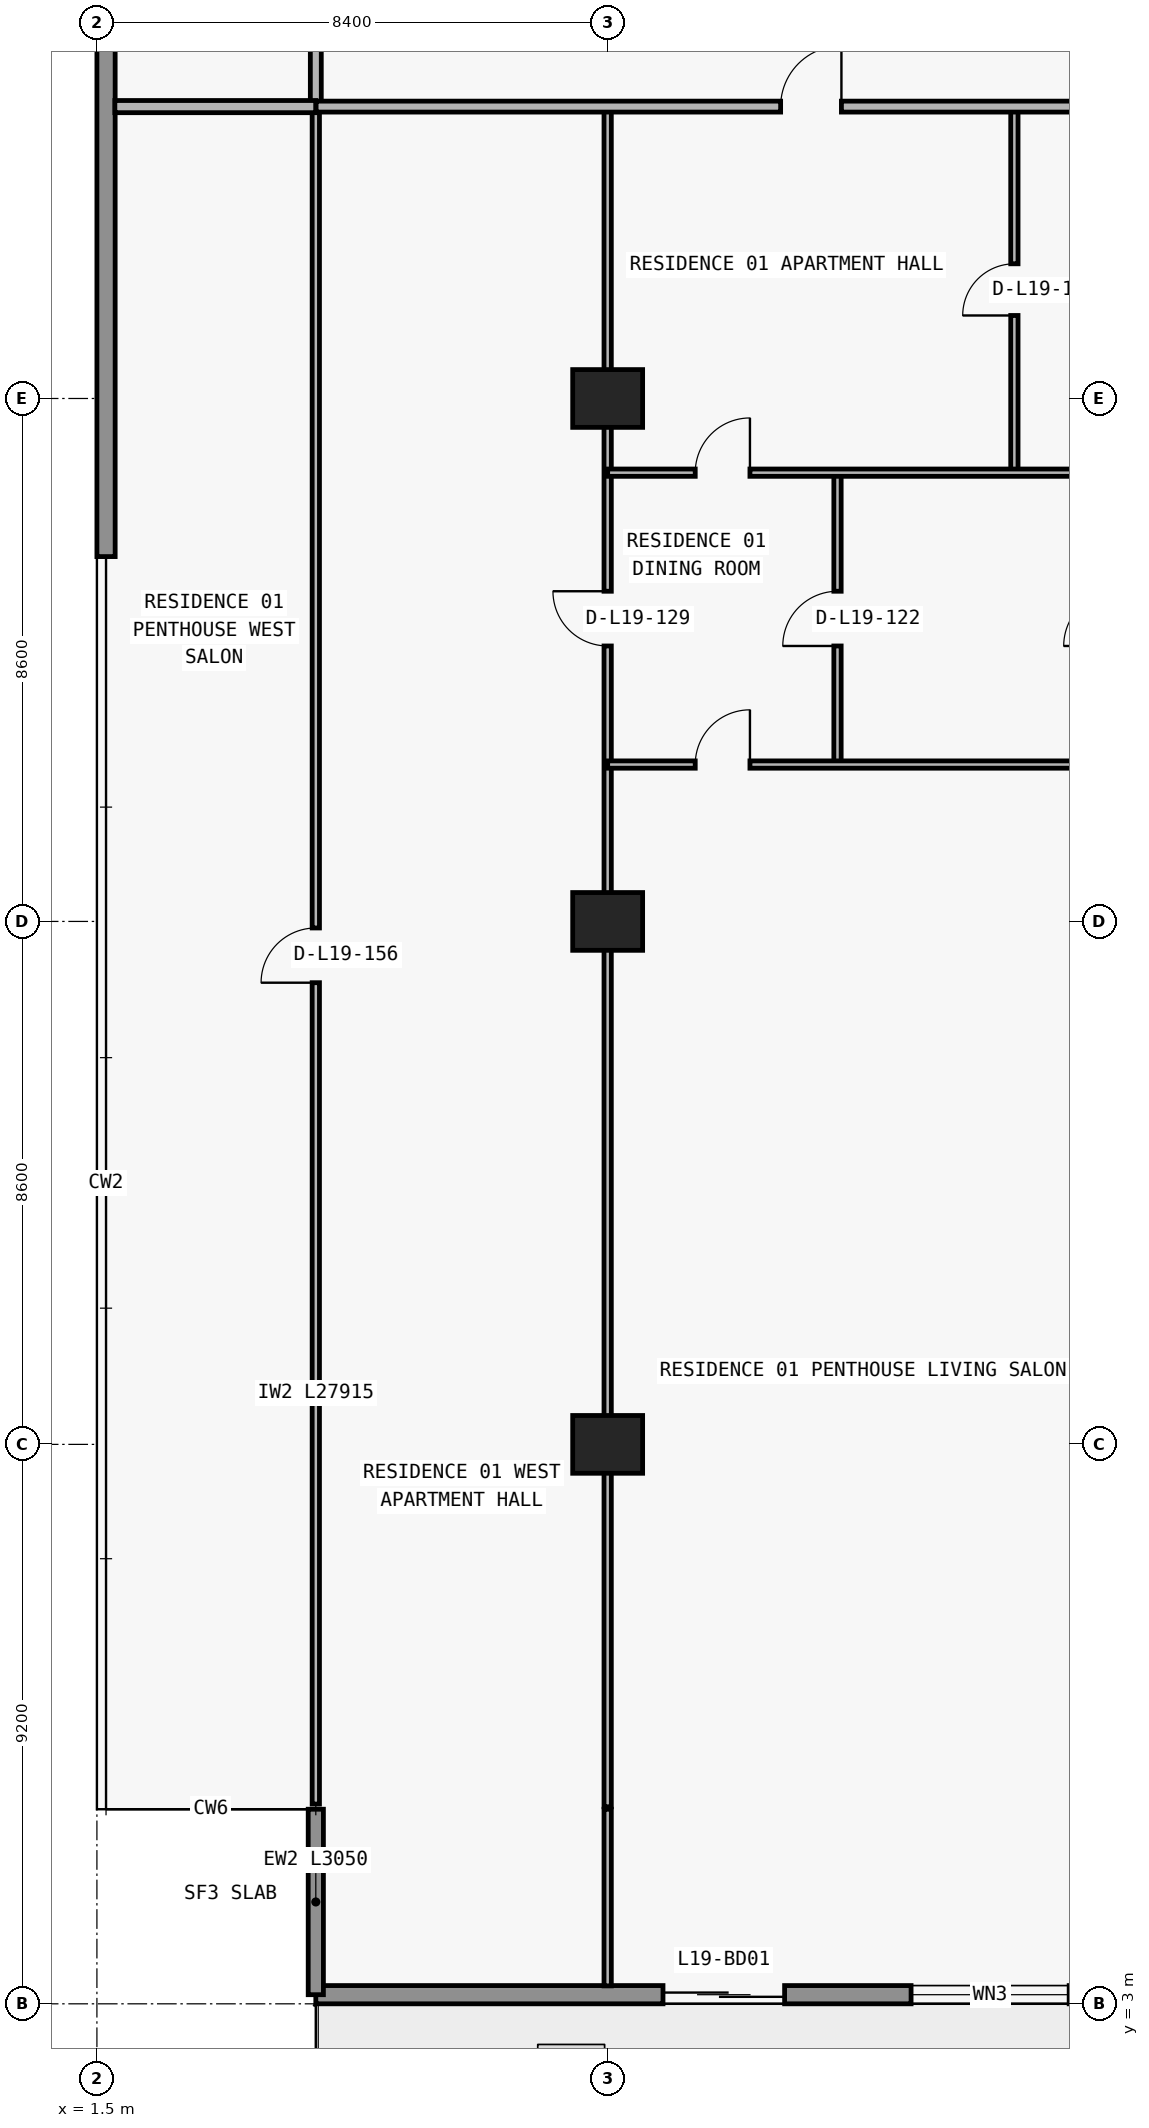
"""IFC4 building model, lengths in metres.
Left out: names, types, materials, properties, quantities, classifications, styles, units other than length and angle.
Written with IfcOpenShell. Run it as: python <this file> out.ifc"""

import sys

from ifc_helpers import new_model, si_unit, direction, frame, frame_2d, origin, origin_2d, place, context, subcontext, project, spatial, rectangle, extrude, element, fill, save


model = new_model("IFC4")
c1 = context("Model", 3, precision=1e-05, world=origin(), true_north=direction((0.0, 1.0)))
c2 = subcontext(c1, "Body", "Model", "MODEL_VIEW")
j1 = project(units=[si_unit("LENGTHUNIT", "METRE"), si_unit("PLANEANGLEUNIT", "RADIAN")], contexts=[c1])
p1 = place(None, origin())
s1 = spatial("IfcSite", under=j1, at=p1, CompositionType="ELEMENT")
p2 = place(p1, origin())
s2 = spatial("IfcBuilding", under=s1, at=p2, CompositionType="ELEMENT")
p3 = place(p2, frame((0.0, 0.0, 72.9)))
s3 = spatial("IfcBuildingStorey", under=s2, at=p3, CompositionType="ELEMENT", Elevation=72.9)
for number, where, z_axis, x_axis in (
    (1, (9.9, 12.2, 0.0), (0.0, 0.0, 1.0), (1.0, 0.0, 0.0)),
    (2, (9.9, 20.8, 0.0), (0.0, 0.0, 1.0), (1.0, 0.0, 0.0)),
    (3, (9.9, 29.4, 0.0), (0.0, 0.0, 1.0), (1.0, 0.0, 0.0)),
):
    element("IfcColumn", number, at=place(p3, frame(where, z_axis=z_axis, x_axis=x_axis)), inside=s3, PredefinedType="COLUMN", context=c2, shape_type="SweptSolid", body=[
        extrude(rectangle(XDim=1.15, YDim=0.95, at=origin_2d()), origin(), (0.0, 0.0, 1.0), 3.05),
    ])
p4 = place(p3, frame((72.7, 3.15, 0.0), z_axis=(0.0, 0.0, 1.0), x_axis=(-1.0, 0.0, 0.0)))
e4 = element("IfcWall", 4, at=p4, inside=s3, PredefinedType="STANDARD", context=c2, shape_type="SweptSolid", body=[
    extrude(rectangle(XDim=67.6, YDim=0.3, at=frame_2d((33.8, 0.0))), origin(), (0.0, 0.0, 1.0), 3.05),
])
p5 = place(p4, frame((59.89, 0.0, 0.0)))
e5 = element("IfcOpeningElement", 5, at=p5, cuts=e4, PredefinedType="OPENING", context=c2, shape_type="SweptSolid", body=[
    extrude(rectangle(XDim=2.0, YDim=2.3, at=frame_2d((1.0, 1.15))), frame((0.0, 0.16, 0.0), z_axis=(0.0, -1.0, 0.0), x_axis=(1.0, 0.0, 0.0)), (0.0, 0.0, 1.0), 0.32),
])
p6 = place(p4, frame((55.21, 0.0, 0.65)))
e6 = element("IfcOpeningElement", 6, at=p6, cuts=e4, PredefinedType="OPENING", context=c2, shape_type="SweptSolid", body=[
    extrude(rectangle(XDim=2.6, YDim=1.85, at=frame_2d((1.3, 0.925))), frame((0.0, 0.16, 0.0), z_axis=(0.0, -1.0, 0.0), x_axis=(1.0, 0.0, 0.0)), (0.0, 0.0, 1.0), 0.32),
])
p7 = place(p4, frame((49.1, 0.0, 0.85)))
e7 = element("IfcOpeningElement", 7, at=p7, cuts=e4, PredefinedType="OPENING", context=c2, shape_type="SweptSolid", body=[
    extrude(rectangle(XDim=2.2, YDim=1.55, at=frame_2d((1.1, 0.775))), frame((0.0, 0.16, 0.0), z_axis=(0.0, -1.0, 0.0), x_axis=(1.0, 0.0, 0.0)), (0.0, 0.0, 1.0), 0.32),
])
p8 = place(p4, frame((43.09, 0.0, 0.0)))
e8 = element("IfcOpeningElement", 8, at=p8, cuts=e4, PredefinedType="OPENING", context=c2, shape_type="SweptSolid", body=[
    extrude(rectangle(XDim=2.0, YDim=2.3, at=frame_2d((1.0, 1.15))), frame((0.0, 0.16, 0.0), z_axis=(0.0, -1.0, 0.0), x_axis=(1.0, 0.0, 0.0)), (0.0, 0.0, 1.0), 0.32),
])
p9 = place(p4, frame((38.41, 0.0, 0.65)))
e9 = element("IfcOpeningElement", 9, at=p9, cuts=e4, PredefinedType="OPENING", context=c2, shape_type="SweptSolid", body=[
    extrude(rectangle(XDim=2.6, YDim=1.85, at=frame_2d((1.3, 0.925))), frame((0.0, 0.16, 0.0), z_axis=(0.0, -1.0, 0.0), x_axis=(1.0, 0.0, 0.0)), (0.0, 0.0, 1.0), 0.32),
])
p10 = place(p4, frame((32.7, 0.0, 0.85)))
e10 = element("IfcOpeningElement", 10, at=p10, cuts=e4, PredefinedType="OPENING", context=c2, shape_type="SweptSolid", body=[
    extrude(rectangle(XDim=2.2, YDim=1.55, at=frame_2d((1.1, 0.775))), frame((0.0, 0.16, 0.0), z_axis=(0.0, -1.0, 0.0), x_axis=(1.0, 0.0, 0.0)), (0.0, 0.0, 1.0), 0.32),
])
p11 = place(p4, frame((24.7, 0.0, 0.85)))
e11 = element("IfcOpeningElement", 11, at=p11, cuts=e4, PredefinedType="OPENING", context=c2, shape_type="SweptSolid", body=[
    extrude(rectangle(XDim=2.2, YDim=1.55, at=frame_2d((1.1, 0.775))), frame((0.0, 0.16, 0.0), z_axis=(0.0, -1.0, 0.0), x_axis=(1.0, 0.0, 0.0)), (0.0, 0.0, 1.0), 0.32),
])
p12 = place(p4, frame((18.69, 0.0, 0.0)))
e12 = element("IfcOpeningElement", 12, at=p12, cuts=e4, PredefinedType="OPENING", context=c2, shape_type="SweptSolid", body=[
    extrude(rectangle(XDim=2.0, YDim=2.3, at=frame_2d((1.0, 1.15))), frame((0.0, 0.16, 0.0), z_axis=(0.0, -1.0, 0.0), x_axis=(1.0, 0.0, 0.0)), (0.0, 0.0, 1.0), 0.32),
])
p13 = place(p4, frame((14.01, 0.0, 0.65)))
e13 = element("IfcOpeningElement", 13, at=p13, cuts=e4, PredefinedType="OPENING", context=c2, shape_type="SweptSolid", body=[
    extrude(rectangle(XDim=2.6, YDim=1.85, at=frame_2d((1.3, 0.925))), frame((0.0, 0.16, 0.0), z_axis=(0.0, -1.0, 0.0), x_axis=(1.0, 0.0, 0.0)), (0.0, 0.0, 1.0), 0.32),
])
p14 = place(p4, frame((7.9, 0.0, 0.85)))
e14 = element("IfcOpeningElement", 14, at=p14, cuts=e4, PredefinedType="OPENING", context=c2, shape_type="SweptSolid", body=[
    extrude(rectangle(XDim=2.2, YDim=1.55, at=frame_2d((1.1, 0.775))), frame((0.0, 0.16, 0.0), z_axis=(0.0, -1.0, 0.0), x_axis=(1.0, 0.0, 0.0)), (0.0, 0.0, 1.0), 0.32),
])
p15 = place(p3, frame((5.1, 6.2, 0.0), z_axis=(0.0, 0.0, 1.0), x_axis=(0.0, -1.0, 0.0)))
e15 = element("IfcWall", 15, at=p15, inside=s3, PredefinedType="ELEMENTEDWALL", context=c2, shape_type="SweptSolid", body=[
    extrude(rectangle(XDim=3.05, YDim=0.25, at=frame_2d((1.525, 0.0))), origin(), (0.0, 0.0, 1.0), 3.05),
])
p16 = place(p3, frame((1.65, 26.8, 0.0), z_axis=(0.0, 0.0, 1.0), x_axis=(0.0, 1.0, 0.0)))
e16 = element("IfcWall", 16, at=p16, inside=s3, PredefinedType="STANDARD", context=c2, shape_type="SweptSolid", body=[
    extrude(rectangle(XDim=20.6, YDim=0.3, at=frame_2d((10.3, 0.0))), origin(), (0.0, 0.0, 1.0), 3.05),
])
p17 = place(p3, frame((5.1, 6.285, 0.0), z_axis=(0.0, 0.0, 1.0), x_axis=(0.0, 1.0, 0.0)))
e17 = element("IfcWall", 17, at=p17, inside=s3, PredefinedType="PARTITIONING", context=c2, shape_type="SweptSolid", body=[
    extrude(rectangle(XDim=27.915, YDim=0.12, at=frame_2d((13.958, 0.0))), origin(), (0.0, 0.0, 1.0), 3.05),
])
p18 = place(p17, frame((13.508, 0.0, 0.0)))
e18 = element("IfcOpeningElement", 18, at=p18, cuts=e17, PredefinedType="OPENING", context=c2, shape_type="SweptSolid", body=[
    extrude(rectangle(XDim=0.9, YDim=2.15, at=frame_2d((0.45, 1.075))), frame((0.0, 0.07, 0.0), z_axis=(0.0, -1.0, 0.0), x_axis=(1.0, 0.0, 0.0)), (0.0, 0.0, 1.0), 0.14),
])
p19 = place(p3, frame((5.1, 34.205, 0.0), z_axis=(0.0, 0.0, 1.0), x_axis=(0.0, 1.0, 0.0)))
e19 = element("IfcWall", 19, at=p19, inside=s3, PredefinedType="PARTITIONING", context=c2, shape_type="SweptSolid", body=[
    extrude(rectangle(XDim=2.695, YDim=0.18, at=frame_2d((1.347, 0.0))), origin(), (0.0, 0.0, 1.0), 3.05),
])
p20 = place(p3, frame((9.9, 3.295, 0.0), z_axis=(0.0, 0.0, 1.0), x_axis=(0.0, 1.0, 0.0)))
e20 = element("IfcWall", 20, at=p20, inside=s3, PredefinedType="PARTITIONING", context=c2, shape_type="SweptSolid", body=[
    extrude(rectangle(XDim=2.905, YDim=0.12, at=frame_2d((1.453, 0.0))), origin(), (0.0, 0.0, 1.0), 3.05),
])
p21 = place(p3, frame((9.9, 6.24, 0.0), z_axis=(0.0, 0.0, 1.0), x_axis=(0.0, 1.0, 0.0)))
e21 = element("IfcWall", 21, at=p21, inside=s3, PredefinedType="PARTITIONING", context=c2, shape_type="SweptSolid", body=[
    extrude(rectangle(XDim=27.96, YDim=0.12, at=frame_2d((13.98, 0.0))), origin(), (0.0, 0.0, 1.0), 2.11),
])
p22 = place(p21, frame((19.09, 0.0, 0.0)))
e22 = element("IfcOpeningElement", 22, at=p22, cuts=e21, PredefinedType="OPENING", context=c2, shape_type="SweptSolid", body=[
    extrude(rectangle(XDim=0.9, YDim=2.06, at=frame_2d((0.45, 1.03))), frame((0.0, 0.07, 0.0), z_axis=(0.0, -1.0, 0.0), x_axis=(1.0, 0.0, 0.0)), (0.0, 0.0, 1.0), 0.14),
])
p23 = place(p3, frame((13.68, 23.38, 0.0), z_axis=(0.0, 0.0, 1.0), x_axis=(0.0, 1.0, 0.0)))
e23 = element("IfcWall", 23, at=p23, inside=s3, PredefinedType="PARTITIONING", context=c2, shape_type="SweptSolid", body=[
    extrude(rectangle(XDim=4.8, YDim=0.12, at=frame_2d((2.4, 0.0))), origin(), (0.0, 0.0, 1.0), 3.05),
])
p24 = place(p23, frame((1.95, 0.0, 0.0)))
e24 = element("IfcOpeningElement", 24, at=p24, cuts=e23, PredefinedType="OPENING", context=c2, shape_type="SweptSolid", body=[
    extrude(rectangle(XDim=0.9, YDim=2.15, at=frame_2d((0.45, 1.075))), frame((0.0, 0.07, 0.0), z_axis=(0.0, -1.0, 0.0), x_axis=(1.0, 0.0, 0.0)), (0.0, 0.0, 1.0), 0.14),
])
p25 = place(p3, frame((16.589, 28.18, 0.0), z_axis=(0.0, 0.0, 1.0), x_axis=(0.0, 1.0, 0.0)))
e25 = element("IfcWall", 25, at=p25, inside=s3, PredefinedType="PARTITIONING", context=c2, shape_type="SweptSolid", body=[
    extrude(rectangle(XDim=6.02, YDim=0.12, at=frame_2d((3.01, 0.0))), origin(), (0.0, 0.0, 1.0), 3.05),
])
p26 = place(p25, frame((2.585, 0.0, 0.0)))
e26 = element("IfcOpeningElement", 26, at=p26, cuts=e25, PredefinedType="OPENING", context=c2, shape_type="SweptSolid", body=[
    extrude(rectangle(XDim=0.85, YDim=2.1, at=frame_2d((0.425, 1.05))), frame((0.0, 0.07, 0.0), z_axis=(0.0, -1.0, 0.0), x_axis=(1.0, 0.0, 0.0)), (0.0, 0.0, 1.0), 0.14),
])
p27 = place(p3, frame((9.9, 23.38, 0.0), z_axis=(0.0, 0.0, 1.0), x_axis=(1.0, 0.0, 0.0)))
e27 = element("IfcWall", 27, at=p27, inside=s3, PredefinedType="PARTITIONING", context=c2, shape_type="SweptSolid", body=[
    extrude(rectangle(XDim=8.4, YDim=0.12, at=frame_2d((4.2, 0.0))), origin(), (0.0, 0.0, 1.0), 3.05),
])
p28 = place(p27, frame((1.44, 0.0, 0.0)))
e28 = element("IfcOpeningElement", 28, at=p28, cuts=e27, PredefinedType="OPENING", context=c2, shape_type="SweptSolid", body=[
    extrude(rectangle(XDim=0.9, YDim=2.15, at=frame_2d((0.45, 1.075))), frame((0.0, 0.07, 0.0), z_axis=(0.0, -1.0, 0.0), x_axis=(1.0, 0.0, 0.0)), (0.0, 0.0, 1.0), 0.14),
])
p29 = place(p3, frame((9.9, 28.18, 0.0), z_axis=(0.0, 0.0, 1.0), x_axis=(1.0, 0.0, 0.0)))
e29 = element("IfcWall", 29, at=p29, inside=s3, PredefinedType="PARTITIONING", context=c2, shape_type="SweptSolid", body=[
    extrude(rectangle(XDim=8.395, YDim=0.12, at=frame_2d((4.198, 0.0))), origin(), (0.0, 0.0, 1.0), 3.05),
])
p30 = place(p29, frame((1.44, 0.0, 0.0)))
e30 = element("IfcOpeningElement", 30, at=p30, cuts=e29, PredefinedType="OPENING", context=c2, shape_type="SweptSolid", body=[
    extrude(rectangle(XDim=0.9, YDim=2.15, at=frame_2d((0.45, 1.075))), frame((0.0, 0.07, 0.0), z_axis=(0.0, -1.0, 0.0), x_axis=(1.0, 0.0, 0.0)), (0.0, 0.0, 1.0), 0.14),
])
p31 = place(p3, frame((1.795, 34.2, 0.0), z_axis=(0.0, 0.0, 1.0), x_axis=(1.0, 0.0, 0.0)))
e31 = element("IfcWall", 31, at=p31, inside=s3, PredefinedType="PARTITIONING", context=c2, shape_type="SweptSolid", body=[
    extrude(rectangle(XDim=3.305, YDim=0.2, at=frame_2d((1.653, 0.0))), origin(), (0.0, 0.0, 1.0), 3.05),
])
p32 = place(p3, frame((5.105, 34.2, 0.0), z_axis=(0.0, 0.0, 1.0), x_axis=(1.0, 0.0, 0.0)))
e32 = element("IfcWall", 32, at=p32, inside=s3, PredefinedType="PARTITIONING", context=c2, shape_type="SweptSolid", body=[
    extrude(rectangle(XDim=67.595, YDim=0.18, at=frame_2d((33.797, 0.0))), origin(), (0.0, 0.0, 1.0), 3.05),
])
p33 = place(p32, frame((7.639, 0.0, 0.0)))
e33 = element("IfcOpeningElement", 33, at=p33, cuts=e32, PredefinedType="OPENING", context=c2, shape_type="SweptSolid", body=[
    extrude(rectangle(XDim=1.0, YDim=2.2, at=frame_2d((0.5, 1.1))), frame((0.0, 0.1, 0.0), z_axis=(0.0, -1.0, 0.0), x_axis=(1.0, 0.0, 0.0)), (0.0, 0.0, 1.0), 0.2),
])
p34 = place(p32, frame((24.423, 0.0, 0.0)))
e34 = element("IfcOpeningElement", 34, at=p34, cuts=e32, PredefinedType="OPENING", context=c2, shape_type="SweptSolid", body=[
    extrude(rectangle(XDim=1.0, YDim=2.2, at=frame_2d((0.5, 1.1))), frame((0.0, 0.1, 0.0), z_axis=(0.0, -1.0, 0.0), x_axis=(1.0, 0.0, 0.0)), (0.0, 0.0, 1.0), 0.2),
])
p35 = place(p32, frame((48.825, 0.0, 0.0)))
e35 = element("IfcOpeningElement", 35, at=p35, cuts=e32, PredefinedType="OPENING", context=c2, shape_type="SweptSolid", body=[
    extrude(rectangle(XDim=1.0, YDim=2.2, at=frame_2d((0.5, 1.1))), frame((0.0, 0.1, 0.0), z_axis=(0.0, -1.0, 0.0), x_axis=(1.0, 0.0, 0.0)), (0.0, 0.0, 1.0), 0.2),
])
p36 = place(p5, origin())
e36 = element("IfcDoor", 36, at=p36, inside=s3, OperationType="DOUBLE_DOOR_SLIDING", PredefinedType="DOOR", context=c2, shape_type="SweptSolid", body=[
    extrude(rectangle(XDim=2.0, YDim=2.3, at=frame_2d((1.0, 1.15))), frame((0.0, 0.025, 0.0), z_axis=(0.0, -1.0, 0.0), x_axis=(1.0, 0.0, 0.0)), (0.0, 0.0, 1.0), 0.05),
])
fill(e5, e36)
p37 = place(p6, origin())
e37 = element("IfcWindow", 37, at=p37, inside=s3, PartitioningType="SINGLE_PANEL", PredefinedType="WINDOW", context=c2, shape_type="SweptSolid", body=[
    extrude(rectangle(XDim=2.6, YDim=1.85, at=frame_2d((1.3, 0.925))), frame((0.0, 0.03, 0.0), z_axis=(0.0, -1.0, 0.0), x_axis=(1.0, 0.0, 0.0)), (0.0, 0.0, 1.0), 0.06),
])
fill(e6, e37)
p38 = place(p33, origin())
e38 = element("IfcDoor", 38, at=p38, inside=s3, OperationType="SINGLE_SWING_RIGHT", PredefinedType="DOOR", context=c2, shape_type="SweptSolid", body=[
    extrude(rectangle(XDim=1.0, YDim=2.2, at=frame_2d((0.5, 1.1))), frame((0.0, 0.025, 0.0), z_axis=(0.0, -1.0, 0.0), x_axis=(1.0, 0.0, 0.0)), (0.0, 0.0, 1.0), 0.05),
])
fill(e33, e38)
p39 = place(p26, origin())
e39 = element("IfcDoor", 39, at=p39, inside=s3, OperationType="SINGLE_SWING_LEFT", PredefinedType="DOOR", context=c2, shape_type="SweptSolid", body=[
    extrude(rectangle(XDim=0.85, YDim=2.1, at=frame_2d((0.425, 1.05))), frame((0.0, 0.025, 0.0), z_axis=(0.0, -1.0, 0.0), x_axis=(1.0, 0.0, 0.0)), (0.0, 0.0, 1.0), 0.05),
])
fill(e26, e39)
p40 = place(p30, origin())
e40 = element("IfcDoor", 40, at=p40, inside=s3, OperationType="SINGLE_SWING_RIGHT", PredefinedType="DOOR", context=c2, shape_type="SweptSolid", body=[
    extrude(rectangle(XDim=0.9, YDim=2.15, at=frame_2d((0.45, 1.075))), frame((0.0, 0.025, 0.0), z_axis=(0.0, -1.0, 0.0), x_axis=(1.0, 0.0, 0.0)), (0.0, 0.0, 1.0), 0.05),
])
fill(e30, e40)
p41 = place(p24, origin())
e41 = element("IfcDoor", 41, at=p41, inside=s3, OperationType="SINGLE_SWING_LEFT", PredefinedType="DOOR", context=c2, shape_type="SweptSolid", body=[
    extrude(rectangle(XDim=0.9, YDim=2.15, at=frame_2d((0.45, 1.075))), frame((0.0, 0.025, 0.0), z_axis=(0.0, -1.0, 0.0), x_axis=(1.0, 0.0, 0.0)), (0.0, 0.0, 1.0), 0.05),
])
fill(e24, e41)
p42 = place(p28, origin())
e42 = element("IfcDoor", 42, at=p42, inside=s3, OperationType="SINGLE_SWING_RIGHT", PredefinedType="DOOR", context=c2, shape_type="SweptSolid", body=[
    extrude(rectangle(XDim=0.9, YDim=2.15, at=frame_2d((0.45, 1.075))), frame((0.0, 0.025, 0.0), z_axis=(0.0, -1.0, 0.0), x_axis=(1.0, 0.0, 0.0)), (0.0, 0.0, 1.0), 0.05),
])
fill(e28, e42)
p43 = place(p22, origin())
e43 = element("IfcDoor", 43, at=p43, inside=s3, OperationType="SINGLE_SWING_RIGHT", PredefinedType="DOOR", context=c2, shape_type="SweptSolid", body=[
    extrude(rectangle(XDim=0.9, YDim=2.06, at=frame_2d((0.45, 1.03))), frame((0.0, 0.025, 0.0), z_axis=(0.0, -1.0, 0.0), x_axis=(1.0, 0.0, 0.0)), (0.0, 0.0, 1.0), 0.05),
])
fill(e22, e43)
p44 = place(p18, origin())
e44 = element("IfcDoor", 44, at=p44, inside=s3, OperationType="SINGLE_SWING_LEFT", PredefinedType="DOOR", context=c2, shape_type="SweptSolid", body=[
    extrude(rectangle(XDim=0.9, YDim=2.15, at=frame_2d((0.45, 1.075))), frame((0.0, 0.025, 0.0), z_axis=(0.0, -1.0, 0.0), x_axis=(1.0, 0.0, 0.0)), (0.0, 0.0, 1.0), 0.05),
])
fill(e18, e44)
save(model, sys.argv[1])
